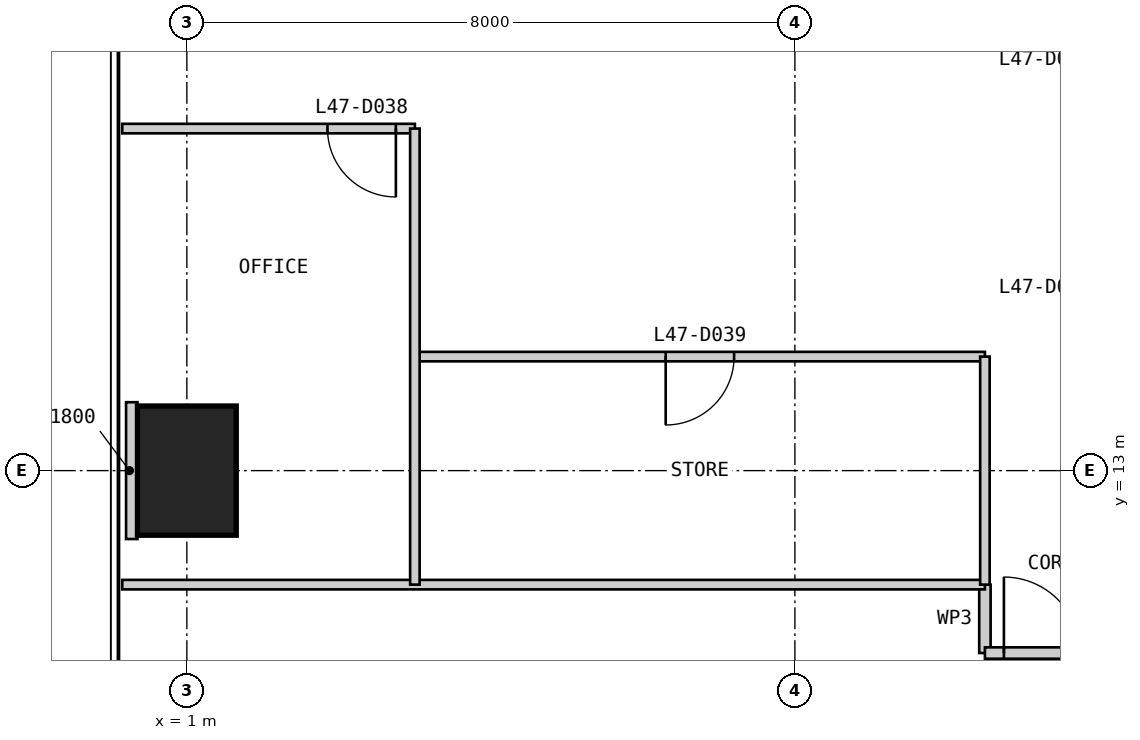
"""IFC4 building model, lengths in metres.
Left out: names, types, materials, properties, quantities, classifications, styles, units other than length and angle.
Written with IfcOpenShell. Run it as: python <this file> out.ifc"""

import sys

from ifc_helpers import new_model, si_unit, direction, frame, frame_2d, origin, origin_2d, place, context, subcontext, project, spatial, rectangle, extrude, element, fill, save


model = new_model("IFC4")
c1 = context("Model", 3, precision=1e-05, world=origin(), true_north=direction((0.0, 1.0)))
c2 = subcontext(c1, "Body", "Model", "MODEL_VIEW")
j1 = project(units=[si_unit("LENGTHUNIT", "METRE"), si_unit("PLANEANGLEUNIT", "RADIAN")], contexts=[c1])
p1 = place(None, origin())
s1 = spatial("IfcSite", under=j1, at=p1, CompositionType="ELEMENT")
p2 = place(p1, origin())
s2 = spatial("IfcBuilding", under=s1, at=p2, CompositionType="ELEMENT")
p3 = place(p2, frame((0.0, 0.0, 201.8)))
s3 = spatial("IfcBuildingStorey", under=s2, at=p3, CompositionType="ELEMENT", Elevation=201.8)
p4 = place(p3, frame((1.0, 13.0, 0.0), z_axis=(0.0, 0.0, 1.0), x_axis=(1.0, 0.0, 0.0)))
e1 = element("IfcColumn", 1, at=p4, inside=s3, PredefinedType="COLUMN", context=c2, shape_type="SweptSolid", body=[
    extrude(rectangle(XDim=1.3, YDim=1.7, at=origin_2d()), origin(), (0.0, 0.0, 1.0), 4.0),
])
p5 = place(p3, frame((11.5, 11.5, 0.0), z_axis=(0.0, 0.0, 1.0), x_axis=(0.0, -1.0, 0.0)))
e2 = element("IfcWall", 2, at=p5, inside=s3, PredefinedType="PARTITIONING", context=c2, shape_type="SweptSolid", body=[
    extrude(rectangle(XDim=0.9, YDim=0.15, at=frame_2d((0.45, 0.0))), origin(), (0.0, 0.0, 1.0), 3.85),
])
p6 = place(p3, frame((11.5, 10.6, 0.0), z_axis=(0.0, 0.0, 1.0), x_axis=(1.0, 0.0, 0.0)))
e3 = element("IfcWall", 3, at=p6, inside=s3, PredefinedType="PARTITIONING", context=c2, shape_type="SweptSolid", body=[
    extrude(rectangle(XDim=27.0, YDim=0.15, at=frame_2d((13.5, 0.0))), origin(), (0.0, 0.0, 1.0), 3.85),
])
p7 = place(p6, frame((0.25, 0.0, 0.0)))
e4 = element("IfcOpeningElement", 4, at=p7, cuts=e3, PredefinedType="OPENING", context=c2, shape_type="SweptSolid", body=[
    extrude(rectangle(XDim=1.0, YDim=2.2, at=frame_2d((0.5, 1.1))), frame((0.0, 0.085, 0.0), z_axis=(0.0, -1.0, 0.0), x_axis=(1.0, 0.0, 0.0)), (0.0, 0.0, 1.0), 0.17),
])
p8 = place(p6, frame((22.75, 0.0, 0.0)))
e5 = element("IfcOpeningElement", 5, at=p8, cuts=e3, PredefinedType="OPENING", context=c2, shape_type="SweptSolid", body=[
    extrude(rectangle(XDim=1.0, YDim=2.2, at=frame_2d((0.5, 1.1))), frame((0.0, 0.085, 0.0), z_axis=(0.0, -1.0, 0.0), x_axis=(1.0, 0.0, 0.0)), (0.0, 0.0, 1.0), 0.17),
])
p9 = place(p3, frame((0.15, 11.5, 0.0), z_axis=(0.0, 0.0, 1.0), x_axis=(1.0, 0.0, 0.0)))
e6 = element("IfcWall", 6, at=p9, inside=s3, PredefinedType="PARTITIONING", context=c2, shape_type="SweptSolid", body=[
    extrude(rectangle(XDim=11.35, YDim=0.125, at=frame_2d((5.675, 0.0))), origin(), (0.0, 0.0, 1.0), 3.85),
])
p10 = place(p3, frame((0.15, 17.5, 0.0), z_axis=(0.0, 0.0, 1.0), x_axis=(1.0, 0.0, 0.0)))
e7 = element("IfcWall", 7, at=p10, inside=s3, PredefinedType="PARTITIONING", context=c2, shape_type="SweptSolid", body=[
    extrude(rectangle(XDim=3.85, YDim=0.125, at=frame_2d((1.925, 0.0))), origin(), (0.0, 0.0, 1.0), 3.85),
])
p11 = place(p10, frame((2.7, 0.0, 0.0)))
e8 = element("IfcOpeningElement", 8, at=p11, cuts=e7, PredefinedType="OPENING", context=c2, shape_type="SweptSolid", body=[
    extrude(rectangle(XDim=0.9, YDim=2.2, at=frame_2d((0.45, 1.1))), frame((0.0, 0.073, 0.0), z_axis=(0.0, -1.0, 0.0), x_axis=(1.0, 0.0, 0.0)), (0.0, 0.0, 1.0), 0.145),
])
p12 = place(p3, frame((4.0, 14.5, 0.0), z_axis=(0.0, 0.0, 1.0), x_axis=(1.0, 0.0, 0.0)))
e9 = element("IfcWall", 9, at=p12, inside=s3, PredefinedType="PARTITIONING", context=c2, shape_type="SweptSolid", body=[
    extrude(rectangle(XDim=7.5, YDim=0.125, at=frame_2d((3.75, 0.0))), origin(), (0.0, 0.0, 1.0), 3.85),
])
p13 = place(p12, frame((3.3, 0.0, 0.0)))
e10 = element("IfcOpeningElement", 10, at=p13, cuts=e9, PredefinedType="OPENING", context=c2, shape_type="SweptSolid", body=[
    extrude(rectangle(XDim=0.9, YDim=2.2, at=frame_2d((0.45, 1.1))), frame((0.0, 0.073, 0.0), z_axis=(0.0, -1.0, 0.0), x_axis=(1.0, 0.0, 0.0)), (0.0, 0.0, 1.0), 0.145),
])
p14 = place(p3, frame((4.0, 17.5, 0.0), z_axis=(0.0, 0.0, 1.0), x_axis=(0.0, -1.0, 0.0)))
e11 = element("IfcWall", 11, at=p14, inside=s3, PredefinedType="PARTITIONING", context=c2, shape_type="SweptSolid", body=[
    extrude(rectangle(XDim=6.0, YDim=0.125, at=frame_2d((3.0, 0.0))), origin(), (0.0, 0.0, 1.0), 3.238),
])
p15 = place(p3, frame((11.5, 14.5, 0.0), z_axis=(0.0, 0.0, 1.0), x_axis=(0.0, -1.0, 0.0)))
e12 = element("IfcWall", 12, at=p15, inside=s3, PredefinedType="PARTITIONING", context=c2, shape_type="SweptSolid", body=[
    extrude(rectangle(XDim=3.0, YDim=0.125, at=frame_2d((1.5, 0.0))), origin(), (0.0, 0.0, 1.0), 3.85),
])
p16 = place(p3, frame((0.2, 13.0, 0.0), z_axis=(0.0, 0.0, 1.0), x_axis=(1.0, 0.0, 0.0)))
e13 = element("IfcWall", 13, at=p16, inside=s3, PredefinedType="PARTITIONING", context=c2, shape_type="SweptSolid", body=[
    extrude(rectangle(XDim=0.15, YDim=1.8, at=frame_2d((0.075, 0.0))), origin(), (0.0, 0.0, 1.0), 3.85),
])
p17 = place(p7, origin())
e14 = element("IfcDoor", 14, at=p17, inside=s3, OperationType="SINGLE_SWING_LEFT", PredefinedType="DOOR", context=c2, shape_type="SweptSolid", body=[
    extrude(rectangle(XDim=1.0, YDim=2.2, at=frame_2d((0.5, 1.1))), frame((0.0, 0.025, 0.0), z_axis=(0.0, -1.0, 0.0), x_axis=(1.0, 0.0, 0.0)), (0.0, 0.0, 1.0), 0.05),
])
fill(e4, e14)
p18 = place(p11, frame((0.9, 0.0, 0.0), z_axis=(0.0, 0.0, 1.0), x_axis=(-1.0, 0.0, 0.0)))
e15 = element("IfcDoor", 15, at=p18, inside=s3, OperationType="SINGLE_SWING_LEFT", PredefinedType="DOOR", context=c2, shape_type="SweptSolid", body=[
    extrude(rectangle(XDim=0.9, YDim=2.2, at=frame_2d((0.45, 1.1))), frame((0.0, 0.025, 0.0), z_axis=(0.0, -1.0, 0.0), x_axis=(1.0, 0.0, 0.0)), (0.0, 0.0, 1.0), 0.05),
])
fill(e8, e15)
p19 = place(p13, frame((0.9, 0.0, 0.0), z_axis=(0.0, 0.0, 1.0), x_axis=(-1.0, 0.0, 0.0)))
e16 = element("IfcDoor", 16, at=p19, inside=s3, OperationType="SINGLE_SWING_RIGHT", PredefinedType="DOOR", context=c2, shape_type="SweptSolid", body=[
    extrude(rectangle(XDim=0.9, YDim=2.2, at=frame_2d((0.45, 1.1))), frame((0.0, 0.025, 0.0), z_axis=(0.0, -1.0, 0.0), x_axis=(1.0, 0.0, 0.0)), (0.0, 0.0, 1.0), 0.05),
])
fill(e10, e16)
save(model, sys.argv[1])
